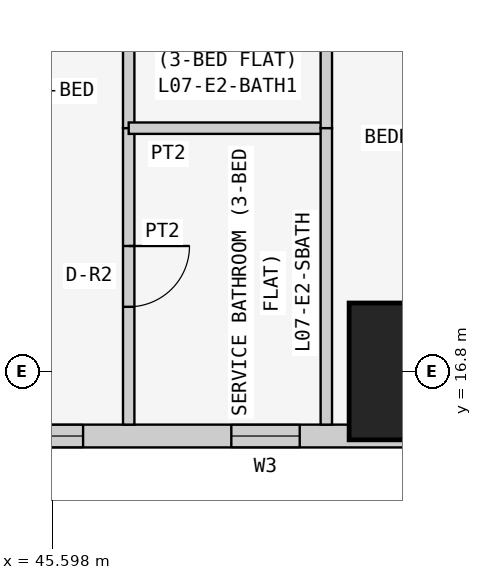
"""IFC4 building model, lengths in metres.
Left out: names, types, materials, properties, quantities, classifications, styles, units other than length and angle.
Written with IfcOpenShell. Run it as: python <this file> out.ifc"""

import sys

from ifc_helpers import new_model, si_unit, direction, frame, frame_2d, origin, origin_2d, place, context, subcontext, project, spatial, rectangle, extrude, element, fill, save


model = new_model("IFC4")
c1 = context("Model", 3, precision=1e-05, world=origin(), true_north=direction((0.0, 1.0)))
c2 = subcontext(c1, "Body", "Model", "MODEL_VIEW")
j1 = project(units=[si_unit("LENGTHUNIT", "METRE"), si_unit("PLANEANGLEUNIT", "RADIAN")], contexts=[c1])
p1 = place(None, origin())
s1 = spatial("IfcSite", under=j1, at=p1, CompositionType="ELEMENT")
p2 = place(p1, origin())
s2 = spatial("IfcBuilding", under=s1, at=p2, CompositionType="ELEMENT")
p3 = place(p2, frame((0.0, 0.0, 34.5)))
s3 = spatial("IfcBuildingStorey", under=s2, at=p3, CompositionType="ELEMENT", Elevation=34.5)
p4 = place(p3, frame((50.4, 16.8, 0.0), z_axis=(0.0, 0.0, 1.0), x_axis=(1.0, 0.0, 0.0)))
e1 = element("IfcColumn", 1, at=p4, inside=s3, PredefinedType="COLUMN", context=c2, shape_type="SweptSolid", body=[
    extrude(rectangle(XDim=1.8, YDim=1.8, at=origin_2d()), origin(), (0.0, 0.0, 1.0), 3.6),
])
p5 = place(p3, frame((43.0, 15.95, 0.0), z_axis=(0.0, 0.0, 1.0), x_axis=(1.0, 0.0, 0.0)))
e2 = element("IfcWall", 2, at=p5, inside=s3, PredefinedType="SOLIDWALL", context=c2, shape_type="SweptSolid", body=[
    extrude(rectangle(XDim=15.4, YDim=0.3, at=frame_2d((7.7, 0.0))), origin(), (0.0, 0.0, 1.0), 3.45),
])
p6 = place(p5, frame((1.2, 0.0, 0.9)))
e3 = element("IfcOpeningElement", 3, at=p6, cuts=e2, PredefinedType="OPENING", context=c2, shape_type="SweptSolid", body=[
    extrude(rectangle(XDim=1.8, YDim=1.5, at=frame_2d((0.9, 0.75))), frame((0.0, 0.16, 0.0), z_axis=(0.0, -1.0, 0.0), x_axis=(1.0, 0.0, 0.0)), (0.0, 0.0, 1.0), 0.32),
])
p7 = place(p5, frame((4.95, 0.0, 1.5)))
e4 = element("IfcOpeningElement", 4, at=p7, cuts=e2, PredefinedType="OPENING", context=c2, shape_type="SweptSolid", body=[
    extrude(rectangle(XDim=0.9, YDim=0.7, at=frame_2d((0.45, 0.35))), frame((0.0, 0.16, 0.0), z_axis=(0.0, -1.0, 0.0), x_axis=(1.0, 0.0, 0.0)), (0.0, 0.0, 1.0), 0.32),
])
p8 = place(p5, frame((8.5, 0.0, 0.9)))
e5 = element("IfcOpeningElement", 5, at=p8, cuts=e2, PredefinedType="OPENING", context=c2, shape_type="SweptSolid", body=[
    extrude(rectangle(XDim=1.8, YDim=1.5, at=frame_2d((0.9, 0.75))), frame((0.0, 0.16, 0.0), z_axis=(0.0, -1.0, 0.0), x_axis=(1.0, 0.0, 0.0)), (0.0, 0.0, 1.0), 0.32),
])
p9 = place(p5, frame((12.5, 0.0, 0.0)))
e6 = element("IfcOpeningElement", 6, at=p9, cuts=e2, PredefinedType="OPENING", context=c2, shape_type="SweptSolid", body=[
    extrude(rectangle(XDim=0.9, YDim=2.4, at=frame_2d((0.45, 1.2))), frame((0.0, 0.16, 0.0), z_axis=(0.0, -1.0, 0.0), x_axis=(1.0, 0.0, 0.0)), (0.0, 0.0, 1.0), 0.32),
])
p10 = place(p5, frame((13.5, 0.0, 0.9)))
e7 = element("IfcOpeningElement", 7, at=p10, cuts=e2, PredefinedType="OPENING", context=c2, shape_type="SweptSolid", body=[
    extrude(rectangle(XDim=1.2, YDim=1.5, at=frame_2d((0.6, 0.75))), frame((0.0, 0.16, 0.0), z_axis=(0.0, -1.0, 0.0), x_axis=(1.0, 0.0, 0.0)), (0.0, 0.0, 1.0), 0.32),
])
p11 = place(p3, frame((46.6, 22.971, 0.0), z_axis=(0.0, 0.0, 1.0), x_axis=(0.0, -1.0, 0.0)))
e8 = element("IfcWall", 8, at=p11, inside=s3, PredefinedType="PARTITIONING", context=c2, shape_type="SweptSolid", body=[
    extrude(rectangle(XDim=2.971, YDim=0.15, at=frame_2d((1.485, 0.0))), origin(), (0.0, 0.0, 1.0), 3.45),
])
p12 = place(p3, frame((46.6, 20.0, 0.0), z_axis=(0.0, 0.0, 1.0), x_axis=(0.0, -1.0, 0.0)))
e9 = element("IfcWall", 9, at=p12, inside=s3, PredefinedType="PARTITIONING", context=c2, shape_type="SweptSolid", body=[
    extrude(rectangle(XDim=3.9, YDim=0.15, at=frame_2d((1.95, 0.0))), origin(), (0.0, 0.0, 1.0), 3.45),
])
p13 = place(p12, frame((1.55, 0.0, 0.0)))
e10 = element("IfcOpeningElement", 10, at=p13, cuts=e9, PredefinedType="OPENING", context=c2, shape_type="SweptSolid", body=[
    extrude(rectangle(XDim=0.8, YDim=2.1, at=frame_2d((0.4, 1.05))), frame((0.0, 0.085, 0.0), z_axis=(0.0, -1.0, 0.0), x_axis=(1.0, 0.0, 0.0)), (0.0, 0.0, 1.0), 0.17),
])
p14 = place(p3, frame((49.2, 20.0, 0.0), z_axis=(0.0, 0.0, 1.0), x_axis=(-1.0, 0.0, 0.0)))
e11 = element("IfcWall", 11, at=p14, inside=s3, PredefinedType="PARTITIONING", context=c2, shape_type="SweptSolid", body=[
    extrude(rectangle(XDim=2.6, YDim=0.15, at=frame_2d((1.3, 0.0))), origin(), (0.0, 0.0, 1.0), 3.45),
])
p15 = place(p3, frame((49.2, 22.971, 0.0), z_axis=(0.0, 0.0, 1.0), x_axis=(0.0, -1.0, 0.0)))
e12 = element("IfcWall", 12, at=p15, inside=s3, PredefinedType="PARTITIONING", context=c2, shape_type="SweptSolid", body=[
    extrude(rectangle(XDim=2.971, YDim=0.15, at=frame_2d((1.485, 0.0))), origin(), (0.0, 0.0, 1.0), 3.45),
])
p16 = place(p3, frame((49.2, 20.0, 0.0), z_axis=(0.0, 0.0, 1.0), x_axis=(0.0, -1.0, 0.0)))
e13 = element("IfcWall", 13, at=p16, inside=s3, PredefinedType="PARTITIONING", context=c2, shape_type="SweptSolid", body=[
    extrude(rectangle(XDim=3.9, YDim=0.15, at=frame_2d((1.95, 0.0))), origin(), (0.0, 0.0, 1.0), 3.45),
])
p17 = place(p6, origin())
e14 = element("IfcWindow", 14, at=p17, inside=s3, PartitioningType="SINGLE_PANEL", PredefinedType="WINDOW", context=c2, shape_type="SweptSolid", body=[
    extrude(rectangle(XDim=1.8, YDim=1.5, at=frame_2d((0.9, 0.75))), frame((0.0, 0.03, 0.0), z_axis=(0.0, -1.0, 0.0), x_axis=(1.0, 0.0, 0.0)), (0.0, 0.0, 1.0), 0.06),
])
fill(e3, e14)
p18 = place(p7, origin())
e15 = element("IfcWindow", 15, at=p18, inside=s3, PartitioningType="SINGLE_PANEL", PredefinedType="WINDOW", context=c2, shape_type="SweptSolid", body=[
    extrude(rectangle(XDim=0.9, YDim=0.7, at=frame_2d((0.45, 0.35))), frame((0.0, 0.03, 0.0), z_axis=(0.0, -1.0, 0.0), x_axis=(1.0, 0.0, 0.0)), (0.0, 0.0, 1.0), 0.06),
])
fill(e4, e15)
p19 = place(p13, origin())
e16 = element("IfcDoor", 16, at=p19, inside=s3, OperationType="SINGLE_SWING_LEFT", PredefinedType="DOOR", context=c2, shape_type="SweptSolid", body=[
    extrude(rectangle(XDim=0.8, YDim=2.1, at=frame_2d((0.4, 1.05))), frame((0.0, 0.025, 0.0), z_axis=(0.0, -1.0, 0.0), x_axis=(1.0, 0.0, 0.0)), (0.0, 0.0, 1.0), 0.05),
])
fill(e10, e16)
save(model, sys.argv[1])
